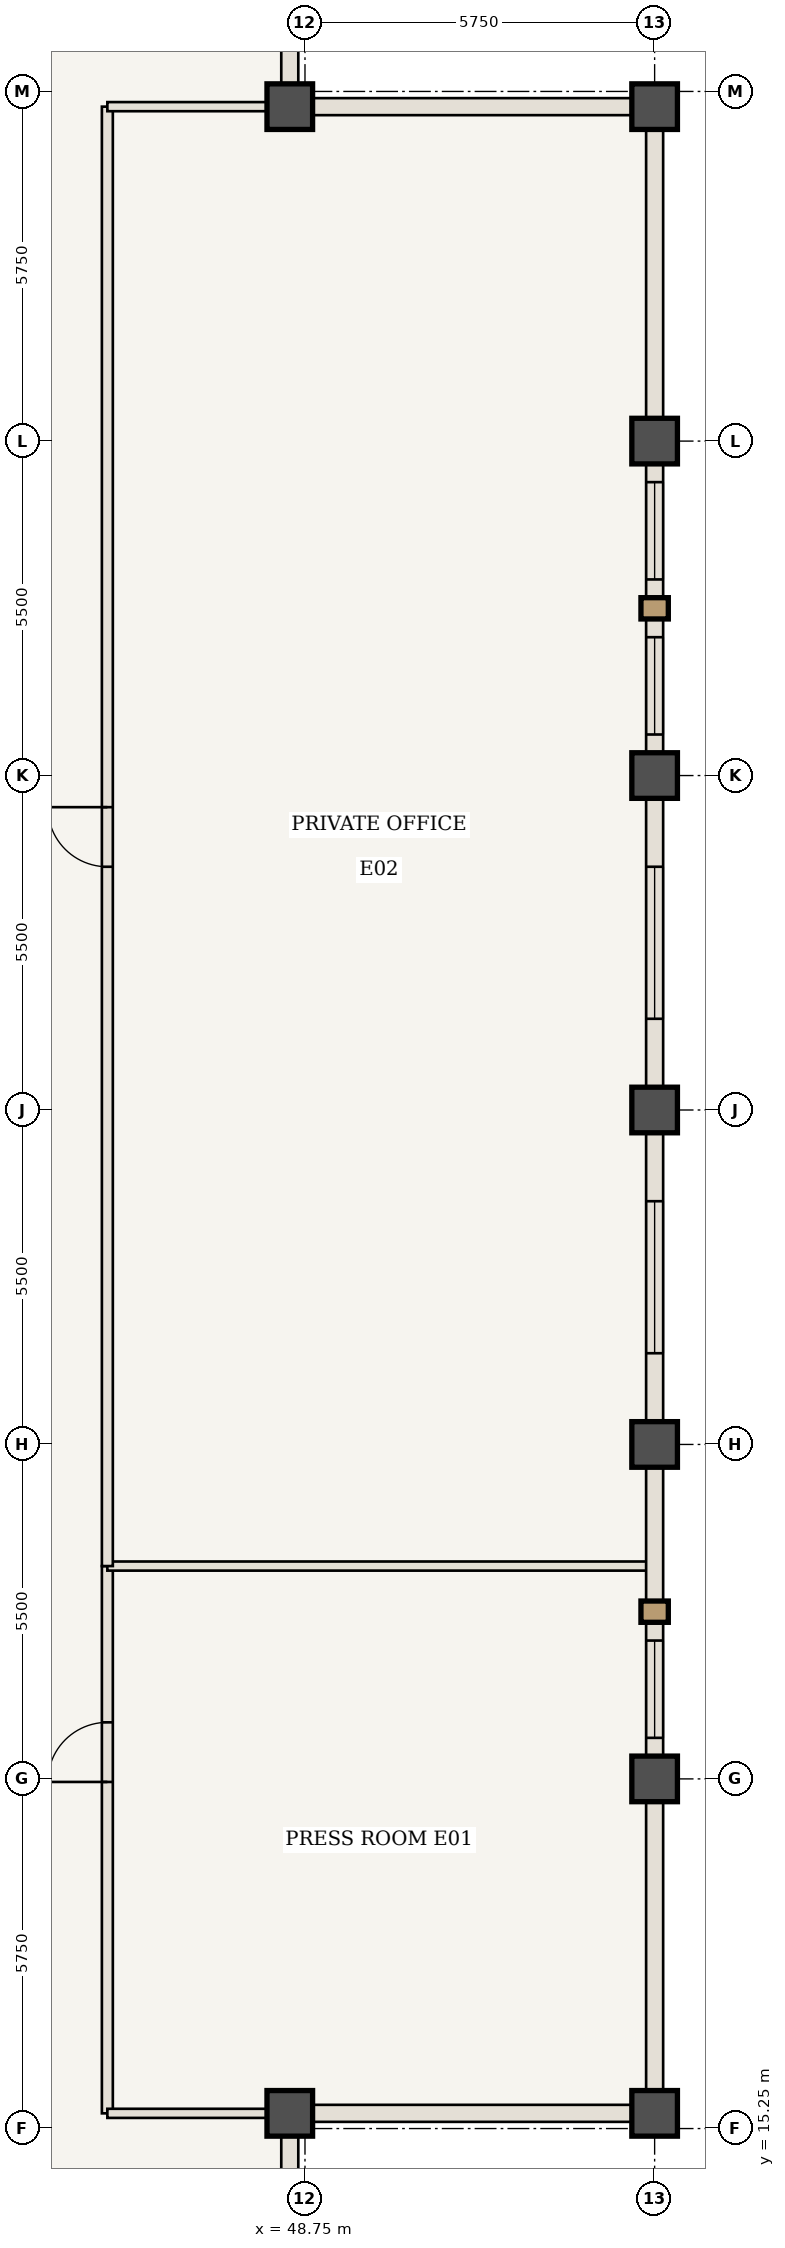
"""IFC4 building model, lengths in metres.
Left out: names, types, materials, properties, quantities, classifications, styles, units other than length and angle.
Written with IfcOpenShell. Run it as: python <this file> out.ifc"""

import sys

from ifc_helpers import new_model, si_unit, direction, frame, frame_2d, origin, origin_2d, place, context, subcontext, project, spatial, rectangle, extrude, element, fill, save


model = new_model("IFC4")
c1 = context("Model", 3, precision=1e-05, world=origin(), true_north=direction((0.0, 1.0)))
c2 = subcontext(c1, "Body", "Model", "MODEL_VIEW")
j1 = project(units=[si_unit("LENGTHUNIT", "METRE"), si_unit("PLANEANGLEUNIT", "RADIAN")], contexts=[c1])
p1 = place(None, origin())
s1 = spatial("IfcSite", under=j1, at=p1, CompositionType="ELEMENT")
p2 = place(p1, origin())
s2 = spatial("IfcBuilding", under=s1, at=p2, CompositionType="ELEMENT")
p3 = place(p2, frame((0.0, 0.0, 273.7)))
s3 = spatial("IfcBuildingStorey", under=s2, at=p3, CompositionType="ELEMENT", Elevation=273.7)
for number, where, z_axis, x_axis in (
    (1, (48.5, 15.5, 0.0), (0.0, 0.0, 1.0), (1.0, 0.0, 0.0)),
    (2, (54.5, 15.5, 0.0), (0.0, 0.0, 1.0), (1.0, 0.0, 0.0)),
    (3, (54.5, 48.5, 0.0), (0.0, 0.0, 1.0), (1.0, 0.0, 0.0)),
    (4, (48.5, 48.5, 0.0), (0.0, 0.0, 1.0), (1.0, 0.0, 0.0)),
    (5, (54.5, 21.0, 0.0), (0.0, 0.0, 1.0), (1.0, 0.0, 0.0)),
    (6, (54.5, 26.5, 0.0), (0.0, 0.0, 1.0), (1.0, 0.0, 0.0)),
    (7, (54.5, 32.0, 0.0), (0.0, 0.0, 1.0), (1.0, 0.0, 0.0)),
    (8, (54.5, 37.5, 0.0), (0.0, 0.0, 1.0), (1.0, 0.0, 0.0)),
    (9, (54.5, 43.0, 0.0), (0.0, 0.0, 1.0), (1.0, 0.0, 0.0)),
):
    element("IfcColumn", number, at=place(p3, frame(where, z_axis=z_axis, x_axis=x_axis)), inside=s3, PredefinedType="COLUMN", context=c2, shape_type="SweptSolid", body=[
        extrude(rectangle(XDim=0.75, YDim=0.75, at=origin_2d()), origin(), (0.0, 0.0, 1.0), 3.85),
    ])
p4 = place(p3, frame((45.5, 15.5, 0.0), z_axis=(0.0, 0.0, 1.0), x_axis=(0.0, 1.0, 0.0)))
e10 = element("IfcWall", 10, at=p4, inside=s3, PredefinedType="STANDARD", context=c2, shape_type="SweptSolid", body=[
    extrude(rectangle(XDim=9.0, YDim=0.18, at=frame_2d((4.5, 0.0))), origin(), (0.0, 0.0, 1.0), 3.685),
])
p5 = place(p4, frame((5.45, 0.0, 0.0)))
e11 = element("IfcOpeningElement", 11, at=p5, cuts=e10, PredefinedType="OPENING", context=c2, shape_type="SweptSolid", body=[
    extrude(rectangle(XDim=0.98, YDim=2.2, at=frame_2d((0.49, 1.1))), frame((0.0, 0.1, 0.0), z_axis=(0.0, -1.0, 0.0), x_axis=(1.0, 0.0, 0.0)), (0.0, 0.0, 1.0), 0.2),
])
p6 = place(p3, frame((45.5, 24.5, 0.0), z_axis=(0.0, 0.0, 1.0), x_axis=(1.0, 0.0, 0.0)))
e12 = element("IfcWall", 12, at=p6, inside=s3, PredefinedType="STANDARD", context=c2, shape_type="SweptSolid", body=[
    extrude(rectangle(XDim=8.94, YDim=0.15, at=frame_2d((4.47, 0.0))), origin(), (0.0, 0.0, 1.0), 3.685),
])
p7 = place(p3, frame((45.5, 24.5, 0.0), z_axis=(0.0, 0.0, 1.0), x_axis=(0.0, 1.0, 0.0)))
e13 = element("IfcWall", 13, at=p7, inside=s3, PredefinedType="STANDARD", context=c2, shape_type="SweptSolid", body=[
    extrude(rectangle(XDim=24.0, YDim=0.18, at=frame_2d((12.0, 0.0))), origin(), (0.0, 0.0, 1.0), 3.685),
])
p8 = place(p7, frame((11.5, 0.0, 0.0)))
e14 = element("IfcOpeningElement", 14, at=p8, cuts=e13, PredefinedType="OPENING", context=c2, shape_type="SweptSolid", body=[
    extrude(rectangle(XDim=0.98, YDim=2.2, at=frame_2d((0.49, 1.1))), frame((0.0, 0.1, 0.0), z_axis=(0.0, -1.0, 0.0), x_axis=(1.0, 0.0, 0.0)), (0.0, 0.0, 1.0), 0.2),
])
for number, where, z_axis, x_axis in (
    (15, (45.5, 15.5, 0.0), (0.0, 0.0, 1.0), (1.0, 0.0, 0.0)),
    (16, (45.5, 48.5, 0.0), (0.0, 0.0, 1.0), (1.0, 0.0, 0.0)),
):
    element("IfcWall", number, at=place(p3, frame(where, z_axis=z_axis, x_axis=x_axis)), inside=s3, PredefinedType="STANDARD", context=c2, shape_type="SweptSolid", body=[
        extrude(rectangle(XDim=3.0, YDim=0.15, at=frame_2d((1.5, 0.0))), origin(), (0.0, 0.0, 1.0), 3.685),
    ])
p9 = place(p3, frame((54.5, 21.0, 0.0), z_axis=(0.0, 0.0, 1.0), x_axis=(0.0, -1.0, 0.0)))
e17 = element("IfcWall", 17, at=p9, inside=s3, PredefinedType="USERDEFINED", context=c2, shape_type="SweptSolid", body=[
    extrude(rectangle(XDim=5.5, YDim=0.28, at=frame_2d((2.75, 0.0))), origin(), (0.0, 0.0, 1.0), 2.985),
])
p10 = place(p3, frame((54.5, 26.5, 0.0), z_axis=(0.0, 0.0, 1.0), x_axis=(0.0, -1.0, 0.0)))
e18 = element("IfcWall", 18, at=p10, inside=s3, PredefinedType="USERDEFINED", context=c2, shape_type="SweptSolid", body=[
    extrude(rectangle(XDim=5.5, YDim=0.28, at=frame_2d((2.75, 0.0))), origin(), (0.0, 0.0, 1.0), 2.985),
])
p11 = place(p10, frame((3.225, 0.0, 0.85)))
e19 = element("IfcOpeningElement", 19, at=p11, cuts=e18, PredefinedType="OPENING", context=c2, shape_type="SweptSolid", body=[
    extrude(rectangle(XDim=1.6, YDim=1.935, at=frame_2d((0.8, 0.968))), frame((0.0, 0.15, 0.0), z_axis=(0.0, -1.0, 0.0), x_axis=(1.0, 0.0, 0.0)), (0.0, 0.0, 1.0), 0.3),
])
p12 = place(p3, frame((54.5, 32.0, 0.0), z_axis=(0.0, 0.0, 1.0), x_axis=(0.0, -1.0, 0.0)))
e20 = element("IfcWall", 20, at=p12, inside=s3, PredefinedType="USERDEFINED", context=c2, shape_type="SweptSolid", body=[
    extrude(rectangle(XDim=5.5, YDim=0.28, at=frame_2d((2.75, 0.0))), origin(), (0.0, 0.0, 1.0), 2.985),
])
p13 = place(p12, frame((1.5, 0.0, 0.85)))
e21 = element("IfcOpeningElement", 21, at=p13, cuts=e20, PredefinedType="OPENING", context=c2, shape_type="SweptSolid", body=[
    extrude(rectangle(XDim=2.5, YDim=1.935, at=frame_2d((1.25, 0.968))), frame((0.0, 0.15, 0.0), z_axis=(0.0, -1.0, 0.0), x_axis=(1.0, 0.0, 0.0)), (0.0, 0.0, 1.0), 0.3),
])
p14 = place(p3, frame((54.5, 37.5, 0.0), z_axis=(0.0, 0.0, 1.0), x_axis=(0.0, -1.0, 0.0)))
e22 = element("IfcWall", 22, at=p14, inside=s3, PredefinedType="USERDEFINED", context=c2, shape_type="SweptSolid", body=[
    extrude(rectangle(XDim=5.5, YDim=0.28, at=frame_2d((2.75, 0.0))), origin(), (0.0, 0.0, 1.0), 2.985),
])
p15 = place(p14, frame((1.5, 0.0, 0.85)))
e23 = element("IfcOpeningElement", 23, at=p15, cuts=e22, PredefinedType="OPENING", context=c2, shape_type="SweptSolid", body=[
    extrude(rectangle(XDim=2.5, YDim=1.935, at=frame_2d((1.25, 0.968))), frame((0.0, 0.15, 0.0), z_axis=(0.0, -1.0, 0.0), x_axis=(1.0, 0.0, 0.0)), (0.0, 0.0, 1.0), 0.3),
])
p16 = place(p3, frame((54.5, 43.0, 0.0), z_axis=(0.0, 0.0, 1.0), x_axis=(0.0, -1.0, 0.0)))
e24 = element("IfcWall", 24, at=p16, inside=s3, PredefinedType="USERDEFINED", context=c2, shape_type="SweptSolid", body=[
    extrude(rectangle(XDim=5.5, YDim=0.28, at=frame_2d((2.75, 0.0))), origin(), (0.0, 0.0, 1.0), 2.985),
])
p17 = place(p16, frame((0.675, 0.0, 0.85)))
e25 = element("IfcOpeningElement", 25, at=p17, cuts=e24, PredefinedType="OPENING", context=c2, shape_type="SweptSolid", body=[
    extrude(rectangle(XDim=1.6, YDim=1.935, at=frame_2d((0.8, 0.968))), frame((0.0, 0.15, 0.0), z_axis=(0.0, -1.0, 0.0), x_axis=(1.0, 0.0, 0.0)), (0.0, 0.0, 1.0), 0.3),
])
p18 = place(p16, frame((3.225, 0.0, 0.85)))
e26 = element("IfcOpeningElement", 26, at=p18, cuts=e24, PredefinedType="OPENING", context=c2, shape_type="SweptSolid", body=[
    extrude(rectangle(XDim=1.6, YDim=1.935, at=frame_2d((0.8, 0.968))), frame((0.0, 0.15, 0.0), z_axis=(0.0, -1.0, 0.0), x_axis=(1.0, 0.0, 0.0)), (0.0, 0.0, 1.0), 0.3),
])
p19 = place(p3, frame((54.5, 48.5, 0.0), z_axis=(0.0, 0.0, 1.0), x_axis=(0.0, -1.0, 0.0)))
e27 = element("IfcWall", 27, at=p19, inside=s3, PredefinedType="USERDEFINED", context=c2, shape_type="SweptSolid", body=[
    extrude(rectangle(XDim=5.5, YDim=0.28, at=frame_2d((2.75, 0.0))), origin(), (0.0, 0.0, 1.0), 2.985),
])
for number, where, z_axis, x_axis in (
    (28, (48.5, 15.5, 0.0), (0.0, 0.0, 1.0), (0.0, -1.0, 0.0)),
    (29, (54.5, 15.5, 0.0), (0.0, 0.0, 1.0), (-1.0, 0.0, 0.0)),
    (30, (48.5, 48.5, 0.0), (0.0, 0.0, 1.0), (1.0, 0.0, 0.0)),
    (31, (48.5, 54.5, 0.0), (0.0, 0.0, 1.0), (0.0, -1.0, 0.0)),
):
    element("IfcWall", number, at=place(p3, frame(where, z_axis=z_axis, x_axis=x_axis)), inside=s3, PredefinedType="USERDEFINED", context=c2, shape_type="SweptSolid", body=[
        extrude(rectangle(XDim=6.0, YDim=0.28, at=frame_2d((3.0, 0.0))), origin(), (0.0, 0.0, 1.0), 2.985),
    ])
p20 = place(p5, origin())
e32 = element("IfcDoor", 32, at=p20, inside=s3, OperationType="SINGLE_SWING_LEFT", PredefinedType="DOOR", context=c2, shape_type="SweptSolid", body=[
    extrude(rectangle(XDim=0.98, YDim=2.2, at=frame_2d((0.49, 1.1))), frame((0.0, 0.025, 0.0), z_axis=(0.0, -1.0, 0.0), x_axis=(1.0, 0.0, 0.0)), (0.0, 0.0, 1.0), 0.05),
])
fill(e11, e32)
p21 = place(p8, origin())
e33 = element("IfcDoor", 33, at=p21, inside=s3, OperationType="SINGLE_SWING_RIGHT", PredefinedType="DOOR", context=c2, shape_type="SweptSolid", body=[
    extrude(rectangle(XDim=0.98, YDim=2.2, at=frame_2d((0.49, 1.1))), frame((0.0, 0.025, 0.0), z_axis=(0.0, -1.0, 0.0), x_axis=(1.0, 0.0, 0.0)), (0.0, 0.0, 1.0), 0.05),
])
fill(e14, e33)
p22 = place(p11, origin())
e34 = element("IfcWindow", 34, at=p22, inside=s3, PartitioningType="SINGLE_PANEL", PredefinedType="WINDOW", context=c2, shape_type="SweptSolid", body=[
    extrude(rectangle(XDim=1.6, YDim=1.935, at=frame_2d((0.8, 0.968))), frame((0.0, 0.03, 0.0), z_axis=(0.0, -1.0, 0.0), x_axis=(1.0, 0.0, 0.0)), (0.0, 0.0, 1.0), 0.06),
])
fill(e19, e34)
p23 = place(p13, origin())
e35 = element("IfcWindow", 35, at=p23, inside=s3, PartitioningType="SINGLE_PANEL", PredefinedType="WINDOW", context=c2, shape_type="SweptSolid", body=[
    extrude(rectangle(XDim=2.5, YDim=1.935, at=frame_2d((1.25, 0.968))), frame((0.0, 0.03, 0.0), z_axis=(0.0, -1.0, 0.0), x_axis=(1.0, 0.0, 0.0)), (0.0, 0.0, 1.0), 0.06),
])
fill(e21, e35)
p24 = place(p15, origin())
e36 = element("IfcWindow", 36, at=p24, inside=s3, PartitioningType="SINGLE_PANEL", PredefinedType="WINDOW", context=c2, shape_type="SweptSolid", body=[
    extrude(rectangle(XDim=2.5, YDim=1.935, at=frame_2d((1.25, 0.968))), frame((0.0, 0.03, 0.0), z_axis=(0.0, -1.0, 0.0), x_axis=(1.0, 0.0, 0.0)), (0.0, 0.0, 1.0), 0.06),
])
fill(e23, e36)
p25 = place(p17, origin())
e37 = element("IfcWindow", 37, at=p25, inside=s3, PartitioningType="SINGLE_PANEL", PredefinedType="WINDOW", context=c2, shape_type="SweptSolid", body=[
    extrude(rectangle(XDim=1.6, YDim=1.935, at=frame_2d((0.8, 0.968))), frame((0.0, 0.03, 0.0), z_axis=(0.0, -1.0, 0.0), x_axis=(1.0, 0.0, 0.0)), (0.0, 0.0, 1.0), 0.06),
])
fill(e25, e37)
p26 = place(p18, origin())
e38 = element("IfcWindow", 38, at=p26, inside=s3, PartitioningType="SINGLE_PANEL", PredefinedType="WINDOW", context=c2, shape_type="SweptSolid", body=[
    extrude(rectangle(XDim=1.6, YDim=1.935, at=frame_2d((0.8, 0.968))), frame((0.0, 0.03, 0.0), z_axis=(0.0, -1.0, 0.0), x_axis=(1.0, 0.0, 0.0)), (0.0, 0.0, 1.0), 0.06),
])
fill(e26, e38)
save(model, sys.argv[1])
